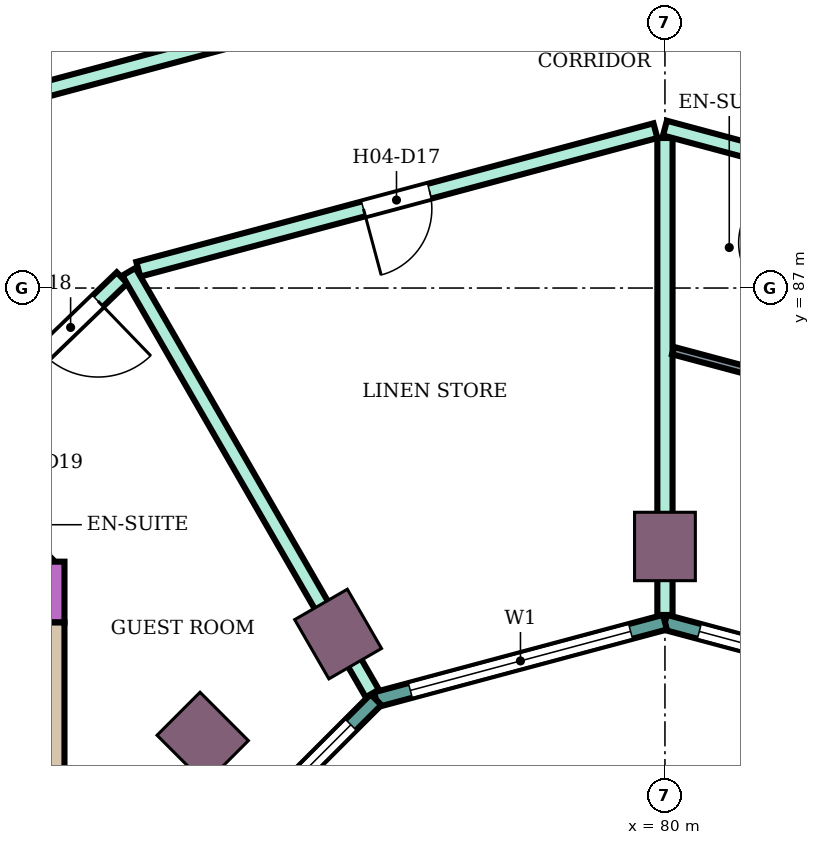
"""IFC4 building model, lengths in metres.
Left out: names, types, materials, properties, quantities, classifications, styles, units other than length and angle.
Written with IfcOpenShell. Run it as: python <this file> out.ifc"""

import sys

from ifc_helpers import new_model, si_unit, direction, frame, frame_2d, origin, origin_2d, place, context, subcontext, project, spatial, rectangle, extrude, element, fill, save


model = new_model("IFC4")
c1 = context("Model", 3, precision=1e-05, world=origin(), true_north=direction((0.0, 1.0)))
c2 = subcontext(c1, "Body", "Model", "MODEL_VIEW")
j1 = project(units=[si_unit("LENGTHUNIT", "METRE"), si_unit("PLANEANGLEUNIT", "RADIAN")], contexts=[c1])
p1 = place(None, origin())
s1 = spatial("IfcSite", under=j1, at=p1, CompositionType="ELEMENT")
p2 = place(p1, origin())
s2 = spatial("IfcBuilding", under=s1, at=p2, CompositionType="ELEMENT")
p3 = place(p2, frame((0.0, 0.0, 66.8)))
s3 = spatial("IfcBuildingStorey", under=s2, at=p3, CompositionType="ELEMENT", Elevation=66.8)
for number, where, z_axis, x_axis in (
    (1, (80.0, 83.6, 0.0), (0.0, 0.0, 1.0), (0.0, 1.0, 0.0)),
    (2, (75.7, 82.448, 0.0), (0.0, 0.0, 1.0), (-0.5, 0.866, 0.0)),
    (3, (73.919, 81.081, 0.0), (0.0, 0.0, 1.0), (-0.707, 0.707, 0.0)),
):
    element("IfcColumn", number, at=place(p3, frame(where, z_axis=z_axis, x_axis=x_axis)), inside=s3, PredefinedType="COLUMN", context=c2, shape_type="SweptSolid", body=[
        extrude(rectangle(XDim=0.9, YDim=0.8, at=origin_2d()), origin(), (0.0, 0.0, 1.0), 3.8),
    ])
p4 = place(p3, frame((72.1, 83.0, 0.0), z_axis=(0.0, 0.0, 1.0), x_axis=(-1.0, 0.0, 0.0)))
e4 = element("IfcWall", 4, at=p4, inside=s3, PredefinedType="SHEAR", context=c2, shape_type="SweptSolid", body=[
    extrude(rectangle(XDim=14.7, YDim=0.8, at=frame_2d((7.35, 0.0))), origin(), (0.0, 0.0, 1.0), 3.48),
])
p5 = place(p4, frame((4.2, 0.0, 0.0)))
e5 = element("IfcOpeningElement", 5, at=p5, cuts=e4, PredefinedType="OPENING", context=c2, shape_type="SweptSolid", body=[
    extrude(rectangle(XDim=2.4, YDim=2.4, at=frame_2d((1.2, 1.2))), frame((0.0, 0.41, 0.0), z_axis=(0.0, -1.0, 0.0), x_axis=(1.0, 0.0, 0.0)), (0.0, 0.0, 1.0), 0.82),
])
p6 = place(p3, frame((71.875, 82.6, 0.0), z_axis=(0.0, 0.0, 1.0), x_axis=(0.0, -1.0, 0.0)))
e6 = element("IfcWall", 6, at=p6, inside=s3, PredefinedType="SHEAR", context=c2, shape_type="SweptSolid", body=[
    extrude(rectangle(XDim=7.6, YDim=0.45, at=frame_2d((3.8, 0.0))), origin(), (0.0, 0.0, 1.0), 3.48),
])
p7 = place(p3, frame((83.802, 81.585, 0.0), z_axis=(0.0, 0.0, 1.0), x_axis=(-0.965933654434, 0.258789828301, 0.0)))
e7 = element("IfcWall", 7, at=p7, inside=s3, PredefinedType="NOTDEFINED", context=c2, shape_type="SweptSolid", body=[
    extrude(rectangle(XDim=3.936, YDim=0.2, at=frame_2d((1.968, 0.0))), origin(), (0.0, 0.0, 1.0), 3.8),
])
p8 = place(p7, frame((0.468, 0.0, 0.9)))
e8 = element("IfcOpeningElement", 8, at=p8, cuts=e7, PredefinedType="OPENING", context=c2, shape_type="SweptSolid", body=[
    extrude(rectangle(XDim=3.0, YDim=2.3, at=frame_2d((1.5, 1.15))), frame((0.0, 0.11, 0.0), z_axis=(0.0, -1.0, 0.0), x_axis=(1.0, 0.0, 0.0)), (0.0, 0.0, 1.0), 0.22),
])
p9 = place(p3, frame((80.0, 82.604, 0.0), z_axis=(0.0, 0.0, 1.0), x_axis=(-0.965933654434, -0.258789828301, 0.0)))
e9 = element("IfcWall", 9, at=p9, inside=s3, PredefinedType="NOTDEFINED", context=c2, shape_type="SweptSolid", body=[
    extrude(rectangle(XDim=3.936, YDim=0.2, at=frame_2d((1.968, 0.0))), origin(), (0.0, 0.0, 1.0), 3.8),
])
p10 = place(p9, frame((0.468, 0.0, 0.9)))
e10 = element("IfcOpeningElement", 10, at=p10, cuts=e9, PredefinedType="OPENING", context=c2, shape_type="SweptSolid", body=[
    extrude(rectangle(XDim=3.0, YDim=2.3, at=frame_2d((1.5, 1.15))), frame((0.0, 0.11, 0.0), z_axis=(0.0, -1.0, 0.0), x_axis=(1.0, 0.0, 0.0)), (0.0, 0.0, 1.0), 0.22),
])
p11 = place(p3, frame((76.198, 81.585, 0.0), z_axis=(0.0, 0.0, 1.0), x_axis=(-0.707106781187, -0.707106781187, 0.0)))
e11 = element("IfcWall", 11, at=p11, inside=s3, PredefinedType="NOTDEFINED", context=c2, shape_type="SweptSolid", body=[
    extrude(rectangle(XDim=3.936, YDim=0.2, at=frame_2d((1.968, 0.0))), origin(), (0.0, 0.0, 1.0), 3.8),
])
p12 = place(p11, frame((0.468, 0.0, 0.9)))
e12 = element("IfcOpeningElement", 12, at=p12, cuts=e11, PredefinedType="OPENING", context=c2, shape_type="SweptSolid", body=[
    extrude(rectangle(XDim=3.0, YDim=2.3, at=frame_2d((1.5, 1.15))), frame((0.0, 0.11, 0.0), z_axis=(0.0, -1.0, 0.0), x_axis=(1.0, 0.0, 0.0)), (0.0, 0.0, 1.0), 0.22),
])
p13 = place(p3, frame((68.987, 83.4, 0.0), z_axis=(0.0, 0.0, 1.0), x_axis=(0.719591503389, 0.694397629784, 0.0)))
e13 = element("IfcWall", 13, at=p13, inside=s3, PredefinedType="PARTITIONING", context=c2, shape_type="SweptSolid", body=[
    extrude(rectangle(XDim=5.378, YDim=0.2, at=frame_2d((2.689, 0.0))), origin(), (0.0, 0.0, 1.0), 3.35),
])
p14 = place(p13, frame((3.938, 0.0, 0.0)))
e14 = element("IfcOpeningElement", 14, at=p14, cuts=e13, PredefinedType="OPENING", context=c2, shape_type="SweptSolid", body=[
    extrude(rectangle(XDim=1.0, YDim=2.1, at=frame_2d((0.5, 1.05))), frame((0.0, 0.11, 0.0), z_axis=(0.0, -1.0, 0.0), x_axis=(1.0, 0.0, 0.0)), (0.0, 0.0, 1.0), 0.22),
])
p15 = place(p3, frame((71.614, 89.55, 0.0), z_axis=(0.0, 0.0, 1.0), x_axis=(0.965982156828, 0.258608725086, 0.0)))
e15 = element("IfcWall", 15, at=p15, inside=s3, PredefinedType="PARTITIONING", context=c2, shape_type="SweptSolid", body=[
    extrude(rectangle(XDim=8.592, YDim=0.2, at=frame_2d((4.296, 0.0))), origin(), (0.0, 0.0, 1.0), 3.35),
])
p16 = place(p15, frame((4.865, 0.0, 0.0)))
e16 = element("IfcOpeningElement", 16, at=p16, cuts=e15, PredefinedType="OPENING", context=c2, shape_type="SweptSolid", body=[
    extrude(rectangle(XDim=1.0, YDim=2.1, at=frame_2d((0.5, 1.05))), frame((0.0, 0.11, 0.0), z_axis=(0.0, -1.0, 0.0), x_axis=(1.0, 0.0, 0.0)), (0.0, 0.0, 1.0), 0.22),
])
p17 = place(p15, frame((2.804, 0.0, 0.0)))
e17 = element("IfcOpeningElement", 17, at=p17, cuts=e15, PredefinedType="OPENING", context=c2, shape_type="SweptSolid", body=[
    extrude(rectangle(XDim=1.0, YDim=2.1, at=frame_2d((0.5, 1.05))), frame((0.0, 0.11, 0.0), z_axis=(0.0, -1.0, 0.0), x_axis=(1.0, 0.0, 0.0)), (0.0, 0.0, 1.0), 0.22),
])
p18 = place(p3, frame((73.071, 87.247, 0.0), z_axis=(0.0, 0.0, 1.0), x_axis=(0.965914318977, 0.258861987157, 0.0)))
e18 = element("IfcWall", 18, at=p18, inside=s3, PredefinedType="PARTITIONING", context=c2, shape_type="SweptSolid", body=[
    extrude(rectangle(XDim=7.043, YDim=0.2, at=frame_2d((3.521, 0.0))), origin(), (0.0, 0.0, 1.0), 3.35),
])
p19 = place(p18, frame((3.067, 0.0, 0.0)))
e19 = element("IfcOpeningElement", 19, at=p19, cuts=e18, PredefinedType="OPENING", context=c2, shape_type="SweptSolid", body=[
    extrude(rectangle(XDim=0.9, YDim=2.1, at=frame_2d((0.45, 1.05))), frame((0.0, 0.11, 0.0), z_axis=(0.0, -1.0, 0.0), x_axis=(1.0, 0.0, 0.0)), (0.0, 0.0, 1.0), 0.22),
])
p20 = place(p3, frame((72.948, 87.214, 0.0), z_axis=(0.0, 0.0, 1.0), x_axis=(0.499927021214, -0.866067534006, 0.0)))
e20 = element("IfcWall", 20, at=p20, inside=s3, PredefinedType="PARTITIONING", context=c2, shape_type="SweptSolid", body=[
    extrude(rectangle(XDim=6.405, YDim=0.2, at=frame_2d((3.203, 0.0))), origin(), (0.0, 0.0, 1.0), 3.35),
])
p21 = place(p3, frame((80.0, 82.699, 0.0), z_axis=(0.0, 0.0, 1.0), x_axis=(0.0, 1.0, 0.0)))
e21 = element("IfcWall", 21, at=p21, inside=s3, PredefinedType="PARTITIONING", context=c2, shape_type="SweptSolid", body=[
    extrude(rectangle(XDim=6.275, YDim=0.2, at=frame_2d((3.138, 0.0))), origin(), (0.0, 0.0, 1.0), 3.35),
])
p22 = place(p3, frame((80.0, 89.104, 0.0), z_axis=(0.0, 0.0, 1.0), x_axis=(0.965854247166, -0.25908603442, 0.0)))
e22 = element("IfcWall", 22, at=p22, inside=s3, PredefinedType="PARTITIONING", context=c2, shape_type="SweptSolid", body=[
    extrude(rectangle(XDim=7.183, YDim=0.2, at=frame_2d((3.592, 0.0))), origin(), (0.0, 0.0, 1.0), 3.35),
])
p23 = place(p22, frame((5.763, 0.0, 0.0)))
e23 = element("IfcOpeningElement", 23, at=p23, cuts=e22, PredefinedType="OPENING", context=c2, shape_type="SweptSolid", body=[
    extrude(rectangle(XDim=1.0, YDim=2.1, at=frame_2d((0.5, 1.05))), frame((0.0, 0.11, 0.0), z_axis=(0.0, -1.0, 0.0), x_axis=(1.0, 0.0, 0.0)), (0.0, 0.0, 1.0), 0.22),
])
p24 = place(p3, frame((80.0, 91.796, 0.0), z_axis=(0.0, 0.0, 1.0), x_axis=(0.965891796243, -0.258946013582, 0.0)))
e24 = element("IfcWall", 24, at=p24, inside=s3, PredefinedType="PARTITIONING", context=c2, shape_type="SweptSolid", body=[
    extrude(rectangle(XDim=8.642, YDim=0.2, at=frame_2d((4.321, 0.0))), origin(), (0.0, 0.0, 1.0), 3.35),
])
p25 = place(p24, frame((2.817, 0.0, 0.0)))
e25 = element("IfcOpeningElement", 25, at=p25, cuts=e24, PredefinedType="OPENING", context=c2, shape_type="SweptSolid", body=[
    extrude(rectangle(XDim=1.0, YDim=2.1, at=frame_2d((0.5, 1.05))), frame((0.0, 0.11, 0.0), z_axis=(0.0, -1.0, 0.0), x_axis=(1.0, 0.0, 0.0)), (0.0, 0.0, 1.0), 0.22),
])
p26 = place(p3, frame((80.106, 86.177, 0.0), z_axis=(0.0, 0.0, 1.0), x_axis=(0.966002973184, -0.258530957139, 0.0)))
e26 = element("IfcWall", 26, at=p26, inside=s3, PredefinedType="PARTITIONING", context=c2, shape_type="SweptSolid", body=[
    extrude(rectangle(XDim=1.19, YDim=0.1, at=frame_2d((0.595, 0.0))), origin(), (0.0, 0.0, 1.0), 3.35),
])
p27 = place(p8, origin())
e27 = element("IfcWindow", 27, at=p27, inside=s3, PartitioningType="SINGLE_PANEL", PredefinedType="WINDOW", context=c2, shape_type="SweptSolid", body=[
    extrude(rectangle(XDim=3.0, YDim=2.3, at=frame_2d((1.5, 1.15))), frame((0.0, 0.03, 0.0), z_axis=(0.0, -1.0, 0.0), x_axis=(1.0, 0.0, 0.0)), (0.0, 0.0, 1.0), 0.06),
])
fill(e8, e27)
p28 = place(p10, origin())
e28 = element("IfcWindow", 28, at=p28, inside=s3, PartitioningType="SINGLE_PANEL", PredefinedType="WINDOW", context=c2, shape_type="SweptSolid", body=[
    extrude(rectangle(XDim=3.0, YDim=2.3, at=frame_2d((1.5, 1.15))), frame((0.0, 0.03, 0.0), z_axis=(0.0, -1.0, 0.0), x_axis=(1.0, 0.0, 0.0)), (0.0, 0.0, 1.0), 0.06),
])
fill(e10, e28)
p29 = place(p12, origin())
e29 = element("IfcWindow", 29, at=p29, inside=s3, PartitioningType="SINGLE_PANEL", PredefinedType="WINDOW", context=c2, shape_type="SweptSolid", body=[
    extrude(rectangle(XDim=3.0, YDim=2.3, at=frame_2d((1.5, 1.15))), frame((0.0, 0.03, 0.0), z_axis=(0.0, -1.0, 0.0), x_axis=(1.0, 0.0, 0.0)), (0.0, 0.0, 1.0), 0.06),
])
fill(e12, e29)
p30 = place(p19, frame((0.9, 0.0, 0.0), z_axis=(0.0, 0.0, 1.0), x_axis=(-1.0, 0.0, 0.0)))
e30 = element("IfcDoor", 30, at=p30, inside=s3, OperationType="SINGLE_SWING_RIGHT", PredefinedType="DOOR", context=c2, shape_type="SweptSolid", body=[
    extrude(rectangle(XDim=0.9, YDim=2.1, at=frame_2d((0.45, 1.05))), frame((0.0, 0.025, 0.0), z_axis=(0.0, -1.0, 0.0), x_axis=(1.0, 0.0, 0.0)), (0.0, 0.0, 1.0), 0.05),
])
fill(e19, e30)
p31 = place(p14, frame((1.0, 0.0, 0.0), z_axis=(0.0, 0.0, 1.0), x_axis=(-1.0, 0.0, 0.0)))
e31 = element("IfcDoor", 31, at=p31, inside=s3, OperationType="SINGLE_SWING_LEFT", PredefinedType="DOOR", context=c2, shape_type="SweptSolid", body=[
    extrude(rectangle(XDim=1.0, YDim=2.1, at=frame_2d((0.5, 1.05))), frame((0.0, 0.025, 0.0), z_axis=(0.0, -1.0, 0.0), x_axis=(1.0, 0.0, 0.0)), (0.0, 0.0, 1.0), 0.05),
])
fill(e14, e31)
save(model, sys.argv[1])
